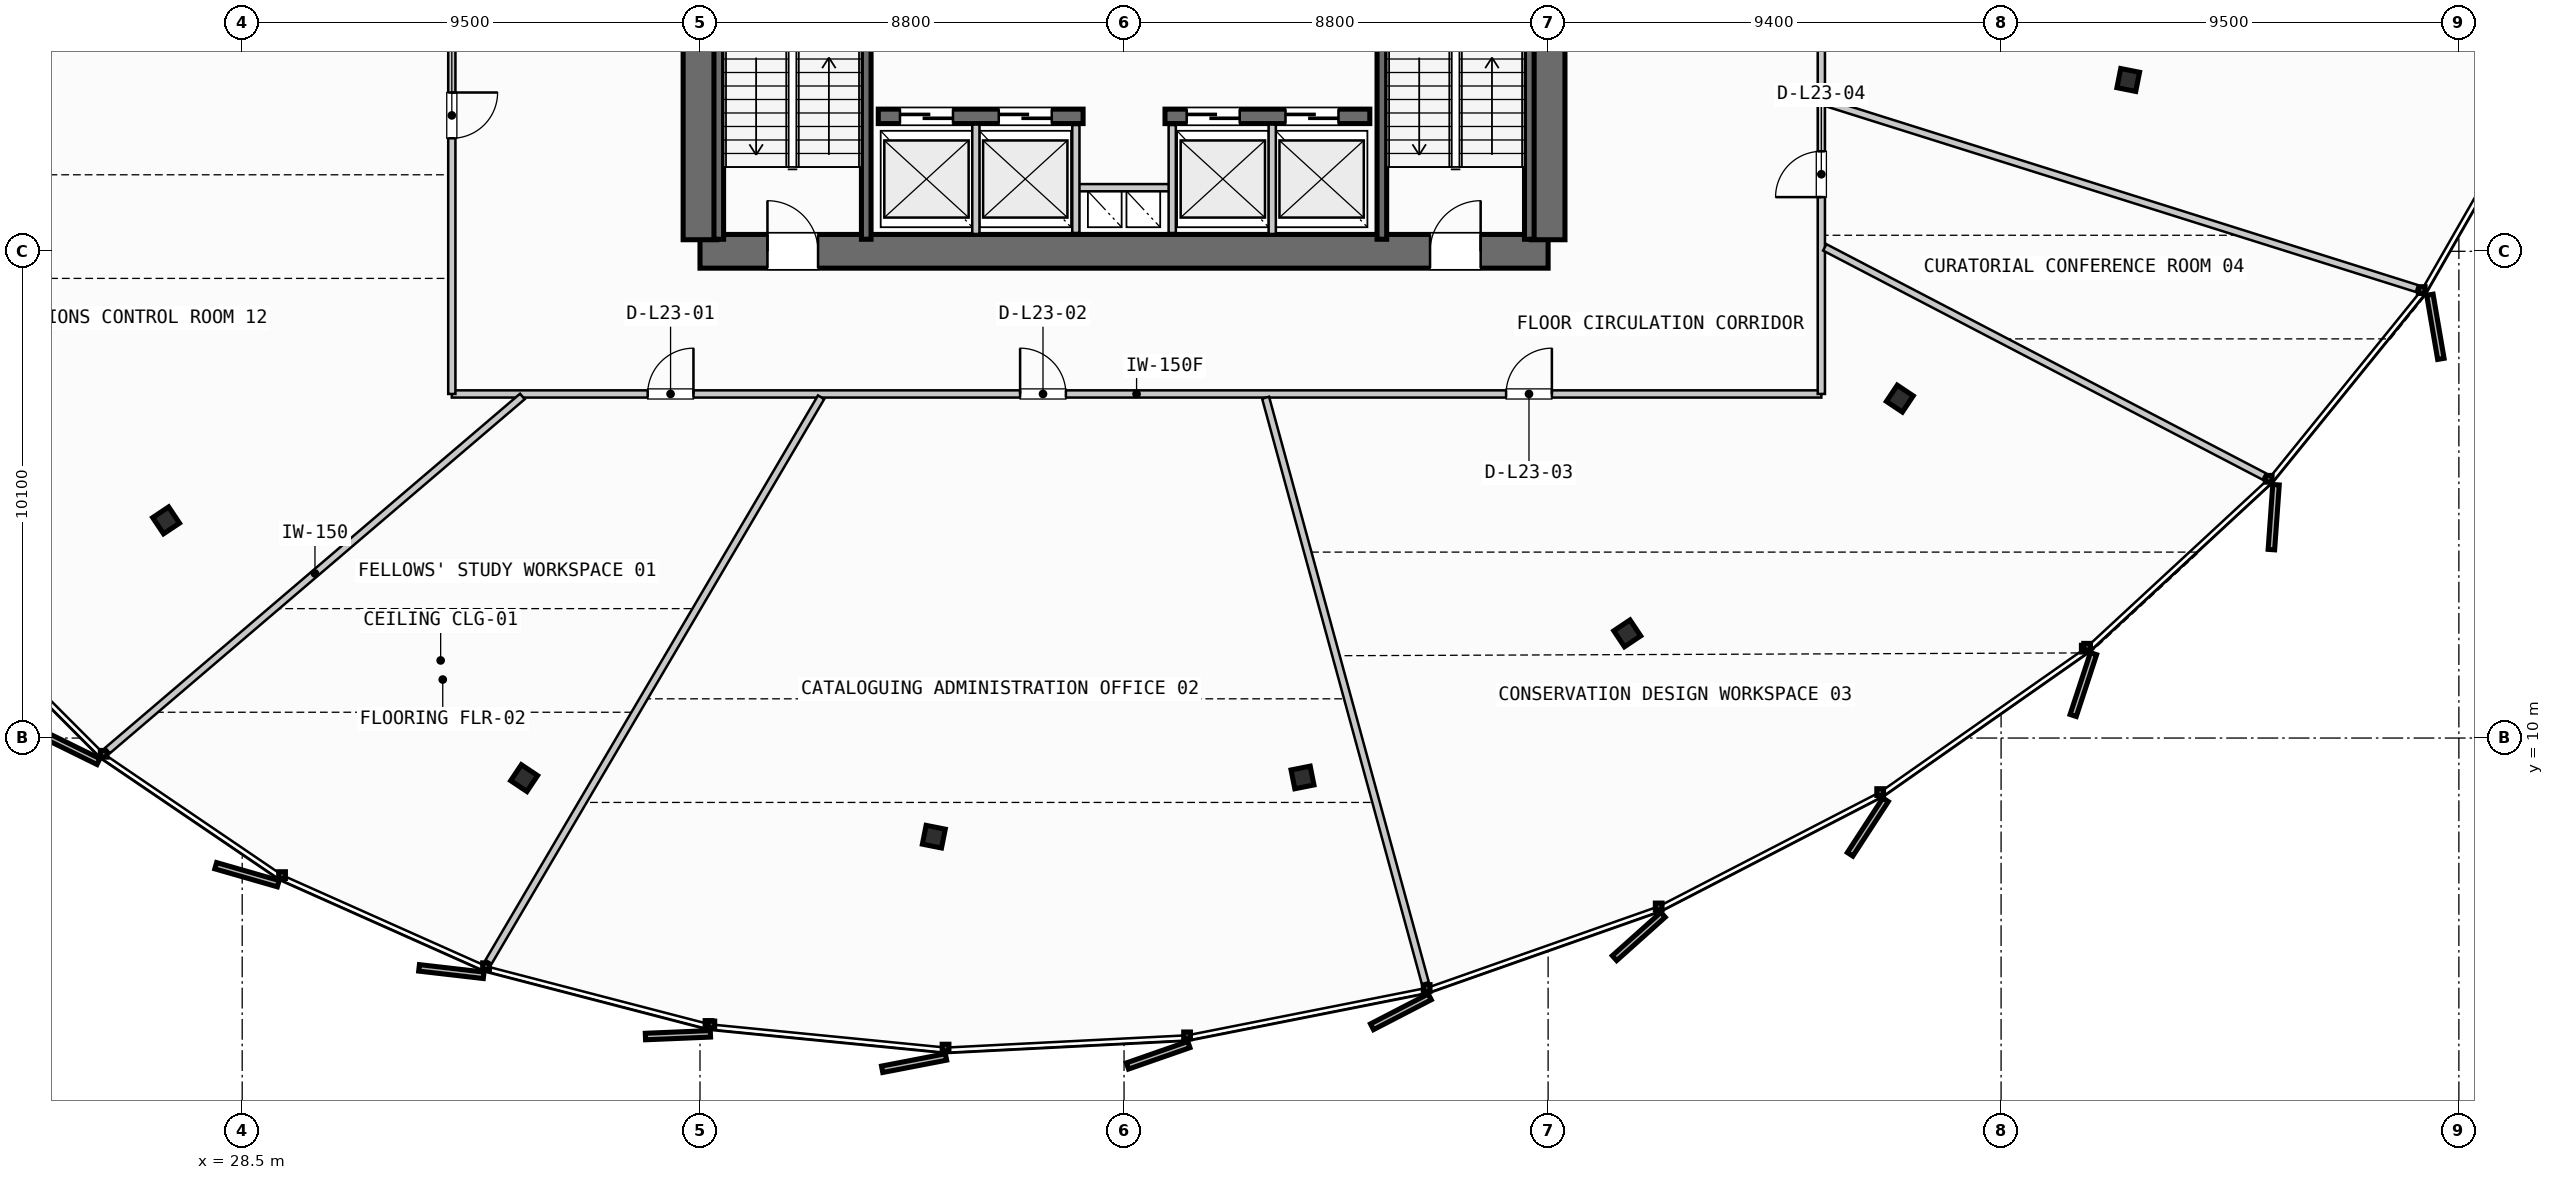
"""IFC4 building model, lengths in metres.
Left out: names, types, materials, properties, quantities, classifications, styles, units other than length and angle.
Written with IfcOpenShell. Run it as: python <this file> out.ifc"""

import sys

from ifc_helpers import new_model, si_unit, direction, frame, frame_2d, origin, origin_2d, place, context, subcontext, project, spatial, rectangle, i_section, extrude, source, transform, mapped, element, fill, save


model = new_model("IFC4")
c1 = context("Model", 3, precision=1e-05, world=origin(), true_north=direction((0.0, 1.0)))
c2 = subcontext(c1, "Body", "Model", "MODEL_VIEW")
j1 = project(units=[si_unit("LENGTHUNIT", "METRE"), si_unit("PLANEANGLEUNIT", "RADIAN")], contexts=[c1])
p1 = place(None, origin())
s1 = spatial("IfcSite", under=j1, at=p1, CompositionType="ELEMENT")
p2 = place(p1, origin())
s2 = spatial("IfcBuilding", under=s1, at=p2, CompositionType="ELEMENT")
p3 = place(p2, frame((0.0, 0.0, 96.4)))
s3 = spatial("IfcBuildingStorey", under=s2, at=p3, CompositionType="ELEMENT", Elevation=96.4)
p4 = place(p3, frame((38.0, 20.1, 0.0), z_axis=(0.0, 0.0, 1.0), x_axis=(1.0, 0.0, 0.0)))
e1 = element("IfcWall", 1, at=p4, inside=s3, PredefinedType="SHEAR", context=c2, shape_type="SweptSolid", body=[
    extrude(rectangle(XDim=17.6, YDim=0.7, at=frame_2d((8.8, 0.0))), origin(), (0.0, 0.0, 1.0), 3.35),
])
p5 = place(p4, frame((1.4, 0.0, 0.0)))
e2 = element("IfcOpeningElement", 2, at=p5, cuts=e1, PredefinedType="OPENING", context=c2, shape_type="SweptSolid", body=[
    extrude(rectangle(XDim=1.05, YDim=2.15, at=frame_2d((0.525, 1.075))), frame((0.0, 0.36, 0.0), z_axis=(0.0, -1.0, 0.0), x_axis=(1.0, 0.0, 0.0)), (0.0, 0.0, 1.0), 0.72),
])
p6 = place(p4, frame((15.15, 0.0, 0.0)))
e3 = element("IfcOpeningElement", 3, at=p6, cuts=e1, PredefinedType="OPENING", context=c2, shape_type="SweptSolid", body=[
    extrude(rectangle(XDim=1.05, YDim=2.15, at=frame_2d((0.525, 1.075))), frame((0.0, 0.36, 0.0), z_axis=(0.0, -1.0, 0.0), x_axis=(1.0, 0.0, 0.0)), (0.0, 0.0, 1.0), 0.72),
])
p7 = place(p3, frame((38.0, 35.26, 0.0), z_axis=(0.0, 0.0, 1.0), x_axis=(0.0, -1.0, 0.0)))
e4 = element("IfcWall", 4, at=p7, inside=s3, PredefinedType="SHEAR", context=c2, shape_type="SweptSolid", body=[
    extrude(rectangle(XDim=14.92, YDim=0.7, at=frame_2d((7.46, 0.0))), origin(), (0.0, 0.0, 1.0), 3.35),
])
p8 = place(p7, frame((5.21, 0.0, 0.0)))
e5 = element("IfcOpeningElement", 5, at=p8, cuts=e4, PredefinedType="OPENING", context=c2, shape_type="SweptSolid", body=[
    extrude(rectangle(XDim=1.1, YDim=2.2, at=frame_2d((0.55, 1.1))), frame((0.0, 0.36, 0.0), z_axis=(0.0, -1.0, 0.0), x_axis=(1.0, 0.0, 0.0)), (0.0, 0.0, 1.0), 0.72),
])
p9 = place(p3, frame((55.6, 20.34, 0.0), z_axis=(0.0, 0.0, 1.0), x_axis=(0.0, 1.0, 0.0)))
e6 = element("IfcWall", 6, at=p9, inside=s3, PredefinedType="SHEAR", context=c2, shape_type="SweptSolid", body=[
    extrude(rectangle(XDim=14.92, YDim=0.7, at=frame_2d((7.46, 0.0))), origin(), (0.0, 0.0, 1.0), 3.35),
])
p10 = place(p9, frame((12.71, 0.0, 0.0)))
e7 = element("IfcOpeningElement", 7, at=p10, cuts=e6, PredefinedType="OPENING", context=c2, shape_type="SweptSolid", body=[
    extrude(rectangle(XDim=1.05, YDim=2.15, at=frame_2d((0.525, 1.075))), frame((0.0, 0.36, 0.0), z_axis=(0.0, -1.0, 0.0), x_axis=(1.0, 0.0, 0.0)), (0.0, 0.0, 1.0), 0.72),
])
p11 = place(p9, frame((8.61, 0.0, 0.0)))
e8 = element("IfcOpeningElement", 8, at=p11, cuts=e6, PredefinedType="OPENING", context=c2, shape_type="SweptSolid", body=[
    extrude(rectangle(XDim=1.1, YDim=2.2, at=frame_2d((0.55, 1.1))), frame((0.0, 0.36, 0.0), z_axis=(0.0, -1.0, 0.0), x_axis=(1.0, 0.0, 0.0)), (0.0, 0.0, 1.0), 0.72),
])
p12 = place(p3, frame((41.7, 22.9, 0.0), z_axis=(0.0, 0.0, 1.0), x_axis=(1.0, 0.0, 0.0)))
e9 = element("IfcWall", 9, at=p12, inside=s3, PredefinedType="SHEAR", context=c2, shape_type="SweptSolid", body=[
    extrude(rectangle(XDim=4.25, YDim=0.3, at=frame_2d((2.125, 0.0))), origin(), (0.0, 0.0, 1.0), 3.35),
])
p13 = place(p12, frame((0.45, 0.0, 0.0)))
e10 = element("IfcOpeningElement", 10, at=p13, cuts=e9, PredefinedType="OPENING", context=c2, shape_type="SweptSolid", body=[
    extrude(rectangle(XDim=1.1, YDim=2.2, at=frame_2d((0.55, 1.1))), frame((0.0, 0.16, 0.0), z_axis=(0.0, -1.0, 0.0), x_axis=(1.0, 0.0, 0.0)), (0.0, 0.0, 1.0), 0.32),
])
p14 = place(p12, frame((2.5, 0.0, 0.0)))
e11 = element("IfcOpeningElement", 11, at=p14, cuts=e9, PredefinedType="OPENING", context=c2, shape_type="SweptSolid", body=[
    extrude(rectangle(XDim=1.1, YDim=2.2, at=frame_2d((0.55, 1.1))), frame((0.0, 0.16, 0.0), z_axis=(0.0, -1.0, 0.0), x_axis=(1.0, 0.0, 0.0)), (0.0, 0.0, 1.0), 0.32),
])
p15 = place(p3, frame((47.65, 22.9, 0.0), z_axis=(0.0, 0.0, 1.0), x_axis=(1.0, 0.0, 0.0)))
e12 = element("IfcWall", 12, at=p15, inside=s3, PredefinedType="SHEAR", context=c2, shape_type="SweptSolid", body=[
    extrude(rectangle(XDim=4.25, YDim=0.3, at=frame_2d((2.125, 0.0))), origin(), (0.0, 0.0, 1.0), 3.35),
])
p16 = place(p15, frame((0.45, 0.0, 0.0)))
e13 = element("IfcOpeningElement", 13, at=p16, cuts=e12, PredefinedType="OPENING", context=c2, shape_type="SweptSolid", body=[
    extrude(rectangle(XDim=1.1, YDim=2.2, at=frame_2d((0.55, 1.1))), frame((0.0, 0.16, 0.0), z_axis=(0.0, -1.0, 0.0), x_axis=(1.0, 0.0, 0.0)), (0.0, 0.0, 1.0), 0.32),
])
p17 = place(p15, frame((2.5, 0.0, 0.0)))
e14 = element("IfcOpeningElement", 14, at=p17, cuts=e12, PredefinedType="OPENING", context=c2, shape_type="SweptSolid", body=[
    extrude(rectangle(XDim=1.1, YDim=2.2, at=frame_2d((0.55, 1.1))), frame((0.0, 0.16, 0.0), z_axis=(0.0, -1.0, 0.0), x_axis=(1.0, 0.0, 0.0)), (0.0, 0.0, 1.0), 0.32),
])
m1 = source(origin(), c2, "Body", "SweptSolid", [
    extrude(i_section(OverallWidth=0.405, OverallDepth=0.398, WebThickness=0.035, FlangeThickness=0.056, FilletRadius=0.015, at=origin_2d()), origin(), (0.0, 0.0, 1.0), 3.35),
])
for number, where, z_axis, x_axis in (
    (15, (26.921, 14.517, 0.0), (0.0, 0.0, 1.0), (-0.831, -0.556, 0.0)),
    (16, (34.351, 9.168, 0.0), (0.0, 0.0, 1.0), (-0.556, -0.831, 0.0)),
    (17, (42.852, 7.954, 0.0), (0.0, 0.0, 1.0), (-0.195, -0.981, 0.0)),
    (18, (50.503, 9.182, 0.0), (0.0, 0.0, 1.0), (0.195, -0.981, 0.0)),
    (19, (57.242, 12.172, 0.0), (0.0, 0.0, 1.0), (0.556, -0.831, 0.0)),
    (20, (62.899, 17.043, 0.0), (0.0, 0.0, 1.0), (0.831, -0.556, 0.0)),
    (21, (67.639, 23.655, 0.0), (0.0, 0.0, 1.0), (0.981, -0.195, 0.0)),
):
    element("IfcColumn", number, at=place(p3, frame(where, z_axis=z_axis, x_axis=x_axis)), inside=s3, PredefinedType="COLUMN", context=c2, shape_type="MappedRepresentation", body=[
        mapped(m1, transform((0.0, 0.0, 0.0), scale=1.0)),
    ])
for number, where, z_axis, x_axis in (
    (22, (41.45, 27.7, 0.0), (0.0, 0.0, 1.0), (0.0, -1.0, 0.0)),
    (23, (38.39, 20.35, 0.0), (0.0, 0.0, 1.0), (0.0, 1.0, 0.0)),
    (24, (55.21, 27.7, 0.0), (0.0, 0.0, 1.0), (0.0, -1.0, 0.0)),
    (25, (52.15, 20.35, 0.0), (0.0, 0.0, 1.0), (0.0, 1.0, 0.0)),
):
    element("IfcWall", number, at=place(p3, frame(where, z_axis=z_axis, x_axis=x_axis)), inside=s3, PredefinedType="SHEAR", context=c2, shape_type="SweptSolid", body=[
        extrude(rectangle(XDim=7.35, YDim=0.2, at=frame_2d((3.675, 0.0))), origin(), (0.0, 0.0, 1.0), 3.35),
    ])
p18 = place(p3, frame((45.8, 21.42, 0.0), z_axis=(0.0, 0.0, 1.0), x_axis=(1.0, 0.0, 0.0)))
e26 = element("IfcWall", 26, at=p18, inside=s3, PredefinedType="PARTITIONING", context=c2, shape_type="SweptSolid", body=[
    extrude(rectangle(XDim=2.0, YDim=0.15, at=frame_2d((1.0, 0.0))), origin(), (0.0, 0.0, 1.0), 2.28),
])
for number, where, z_axis, x_axis in (
    (27, (45.8, 20.48, 0.0), (0.0, 0.0, 1.0), (0.0, 1.0, 0.0)),
    (28, (47.8, 20.48, 0.0), (0.0, 0.0, 1.0), (0.0, 1.0, 0.0)),
):
    element("IfcWall", number, at=place(p3, frame(where, z_axis=z_axis, x_axis=x_axis)), inside=s3, PredefinedType="PARTITIONING", context=c2, shape_type="SweptSolid", body=[
        extrude(rectangle(XDim=2.24, YDim=0.15, at=frame_2d((1.12, 0.0))), origin(), (0.0, 0.0, 1.0), 2.28),
    ])
for number, where, z_axis, x_axis in (
    (29, (43.725, 20.46, 0.0), (0.0, 0.0, 1.0), (0.0, 1.0, 0.0)),
    (30, (49.875, 20.46, 0.0), (0.0, 0.0, 1.0), (0.0, 1.0, 0.0)),
):
    element("IfcWall", number, at=place(p3, frame(where, z_axis=z_axis, x_axis=x_axis)), inside=s3, PredefinedType="PARTITIONING", context=c2, shape_type="SweptSolid", body=[
        extrude(rectangle(XDim=2.27, YDim=0.15, at=frame_2d((1.135, 0.0))), origin(), (0.0, 0.0, 1.0), 2.28),
    ])
p19 = place(p3, frame((32.85, 17.14, 0.0), z_axis=(0.0, 0.0, 1.0), x_axis=(1.0, 0.0, 0.0)))
e31 = element("IfcWall", 31, at=p19, inside=s3, PredefinedType="PARTITIONING", context=c2, shape_type="SweptSolid", body=[
    extrude(rectangle(XDim=28.42, YDim=0.15, at=frame_2d((14.21, 0.0))), origin(), (0.0, 0.0, 1.0), 2.28),
])
p20 = place(p19, frame((4.064, 0.0, 0.0)))
e32 = element("IfcOpeningElement", 32, at=p20, cuts=e31, PredefinedType="OPENING", context=c2, shape_type="SweptSolid", body=[
    extrude(rectangle(XDim=0.95, YDim=2.15, at=frame_2d((0.475, 1.075))), frame((0.0, 0.085, 0.0), z_axis=(0.0, -1.0, 0.0), x_axis=(1.0, 0.0, 0.0)), (0.0, 0.0, 1.0), 0.17),
])
p21 = place(p19, frame((11.793, 0.0, 0.0)))
e33 = element("IfcOpeningElement", 33, at=p21, cuts=e31, PredefinedType="OPENING", context=c2, shape_type="SweptSolid", body=[
    extrude(rectangle(XDim=0.95, YDim=2.15, at=frame_2d((0.475, 1.075))), frame((0.0, 0.085, 0.0), z_axis=(0.0, -1.0, 0.0), x_axis=(1.0, 0.0, 0.0)), (0.0, 0.0, 1.0), 0.17),
])
p22 = place(p19, frame((21.878, 0.0, 0.0)))
e34 = element("IfcOpeningElement", 34, at=p22, cuts=e31, PredefinedType="OPENING", context=c2, shape_type="SweptSolid", body=[
    extrude(rectangle(XDim=0.95, YDim=2.15, at=frame_2d((0.475, 1.075))), frame((0.0, 0.085, 0.0), z_axis=(0.0, -1.0, 0.0), x_axis=(1.0, 0.0, 0.0)), (0.0, 0.0, 1.0), 0.17),
])
p23 = place(p3, frame((61.27, 17.14, 0.0), z_axis=(0.0, 0.0, 1.0), x_axis=(0.0, 1.0, 0.0)))
e35 = element("IfcWall", 35, at=p23, inside=s3, PredefinedType="PARTITIONING", context=c2, shape_type="SweptSolid", body=[
    extrude(rectangle(XDim=20.48, YDim=0.15, at=frame_2d((10.24, 0.0))), origin(), (0.0, 0.0, 1.0), 2.28),
])
p24 = place(p23, frame((4.084, 0.0, 0.0)))
e36 = element("IfcOpeningElement", 36, at=p24, cuts=e35, PredefinedType="OPENING", context=c2, shape_type="SweptSolid", body=[
    extrude(rectangle(XDim=0.95, YDim=2.15, at=frame_2d((0.475, 1.075))), frame((0.0, 0.085, 0.0), z_axis=(0.0, -1.0, 0.0), x_axis=(1.0, 0.0, 0.0)), (0.0, 0.0, 1.0), 0.17),
])
p25 = place(p23, frame((8.875, 0.0, 0.0)))
e37 = element("IfcOpeningElement", 37, at=p25, cuts=e35, PredefinedType="OPENING", context=c2, shape_type="SweptSolid", body=[
    extrude(rectangle(XDim=0.95, YDim=2.15, at=frame_2d((0.475, 1.075))), frame((0.0, 0.085, 0.0), z_axis=(0.0, -1.0, 0.0), x_axis=(1.0, 0.0, 0.0)), (0.0, 0.0, 1.0), 0.17),
])
p26 = place(p23, frame((15.482, 0.0, 0.0)))
e38 = element("IfcOpeningElement", 38, at=p26, cuts=e35, PredefinedType="OPENING", context=c2, shape_type="SweptSolid", body=[
    extrude(rectangle(XDim=0.95, YDim=2.15, at=frame_2d((0.475, 1.075))), frame((0.0, 0.085, 0.0), z_axis=(0.0, -1.0, 0.0), x_axis=(1.0, 0.0, 0.0)), (0.0, 0.0, 1.0), 0.17),
])
p27 = place(p3, frame((32.85, 37.62, 0.0), z_axis=(0.0, 0.0, 1.0), x_axis=(0.0, -1.0, 0.0)))
e39 = element("IfcWall", 39, at=p27, inside=s3, PredefinedType="PARTITIONING", context=c2, shape_type="SweptSolid", body=[
    extrude(rectangle(XDim=20.48, YDim=0.15, at=frame_2d((10.24, 0.0))), origin(), (0.0, 0.0, 1.0), 2.28),
])
p28 = place(p27, frame((5.293, 0.0, 0.0)))
e40 = element("IfcOpeningElement", 40, at=p28, cuts=e39, PredefinedType="OPENING", context=c2, shape_type="SweptSolid", body=[
    extrude(rectangle(XDim=0.95, YDim=2.15, at=frame_2d((0.475, 1.075))), frame((0.0, 0.085, 0.0), z_axis=(0.0, -1.0, 0.0), x_axis=(1.0, 0.0, 0.0)), (0.0, 0.0, 1.0), 0.17),
])
p29 = place(p27, frame((14.225, 0.0, 0.0)))
e41 = element("IfcOpeningElement", 41, at=p29, cuts=e39, PredefinedType="OPENING", context=c2, shape_type="SweptSolid", body=[
    extrude(rectangle(XDim=0.95, YDim=2.15, at=frame_2d((0.475, 1.075))), frame((0.0, 0.085, 0.0), z_axis=(0.0, -1.0, 0.0), x_axis=(1.0, 0.0, 0.0)), (0.0, 0.0, 1.0), 0.17),
])
p30 = place(p3, frame((34.314, 17.088, 0.0), z_axis=(0.0, 0.0, 1.0), x_axis=(-0.760649717053, -0.649162543549, 0.0)))
e42 = element("IfcWall", 42, at=p30, inside=s3, PredefinedType="PARTITIONING", context=c2, shape_type="SweptSolid", body=[
    extrude(rectangle(XDim=11.317, YDim=0.15, at=frame_2d((5.659, 0.0))), origin(), (0.0, 0.0, 1.0), 2.28),
])
p31 = place(p3, frame((40.513, 17.071, 0.0), z_axis=(0.0, 0.0, 1.0), x_axis=(-0.507501886908, -0.861650645439, 0.0)))
e43 = element("IfcWall", 43, at=p31, inside=s3, PredefinedType="PARTITIONING", context=c2, shape_type="SweptSolid", body=[
    extrude(rectangle(XDim=13.596, YDim=0.15, at=frame_2d((6.798, 0.0))), origin(), (0.0, 0.0, 1.0), 2.28),
])
p32 = place(p3, frame((49.737, 17.063, 0.0), z_axis=(0.0, 0.0, 1.0), x_axis=(0.263260133771, -0.964724884082, 0.0)))
e44 = element("IfcWall", 44, at=p32, inside=s3, PredefinedType="PARTITIONING", context=c2, shape_type="SweptSolid", body=[
    extrude(rectangle(XDim=12.592, YDim=0.15, at=frame_2d((6.296, 0.0))), origin(), (0.0, 0.0, 1.0), 2.28),
])
p33 = place(p3, frame((61.341, 20.181, 0.0), z_axis=(0.0, 0.0, 1.0), x_axis=(0.886775248426, -0.462200885741, 0.0)))
e45 = element("IfcWall", 45, at=p33, inside=s3, PredefinedType="PARTITIONING", context=c2, shape_type="SweptSolid", body=[
    extrude(rectangle(XDim=10.284, YDim=0.15, at=frame_2d((5.142, 0.0))), origin(), (0.0, 0.0, 1.0), 2.28),
])
p34 = place(p3, frame((61.346, 23.193, 0.0), z_axis=(0.0, 0.0, 1.0), x_axis=(0.953881626894, -0.300183013965, 0.0)))
e46 = element("IfcWall", 46, at=p34, inside=s3, PredefinedType="PARTITIONING", context=c2, shape_type="SweptSolid", body=[
    extrude(rectangle(XDim=12.877, YDim=0.15, at=frame_2d((6.438, 0.0))), origin(), (0.0, 0.0, 1.0), 2.28),
])
m2 = source(origin(), c2, "Body", "SweptSolid", [
    extrude(rectangle(XDim=1.05, YDim=2.15, at=frame_2d((0.525, 1.075))), frame((0.0, 0.025, 0.0), z_axis=(0.0, -1.0, 0.0), x_axis=(1.0, 0.0, 0.0)), (0.0, 0.0, 1.0), 0.05),
])
p35 = place(p5, origin())
e47 = element("IfcDoor", 47, at=p35, inside=s3, OperationType="SINGLE_SWING_LEFT", PredefinedType="DOOR", context=c2, shape_type="MappedRepresentation", body=[
    mapped(m2, transform((0.0, 0.0, 0.0), scale=1.0)),
])
fill(e2, e47)
p36 = place(p6, origin())
e48 = element("IfcDoor", 48, at=p36, inside=s3, OperationType="SINGLE_SWING_RIGHT", PredefinedType="DOOR", context=c2, shape_type="MappedRepresentation", body=[
    mapped(m2, transform((0.0, 0.0, 0.0), scale=1.0)),
])
fill(e3, e48)
m3 = source(origin(), c2, "Body", "SweptSolid", [
    extrude(rectangle(XDim=1.1, YDim=2.2, at=frame_2d((0.55, 1.1))), frame((0.0, 0.025, 0.0), z_axis=(0.0, -1.0, 0.0), x_axis=(1.0, 0.0, 0.0)), (0.0, 0.0, 1.0), 0.05),
])
p37 = place(p13, origin())
e49 = element("IfcDoor", 49, at=p37, inside=s3, OperationType="SLIDING_TO_LEFT", PredefinedType="DOOR", context=c2, shape_type="MappedRepresentation", body=[
    mapped(m3, transform((0.0, 0.0, 0.0), scale=1.0)),
])
fill(e10, e49)
p38 = place(p14, origin())
e50 = element("IfcDoor", 50, at=p38, inside=s3, OperationType="SLIDING_TO_LEFT", PredefinedType="DOOR", context=c2, shape_type="MappedRepresentation", body=[
    mapped(m3, transform((0.0, 0.0, 0.0), scale=1.0)),
])
fill(e11, e50)
p39 = place(p16, origin())
e51 = element("IfcDoor", 51, at=p39, inside=s3, OperationType="SLIDING_TO_LEFT", PredefinedType="DOOR", context=c2, shape_type="MappedRepresentation", body=[
    mapped(m3, transform((0.0, 0.0, 0.0), scale=1.0)),
])
fill(e13, e51)
p40 = place(p17, origin())
e52 = element("IfcDoor", 52, at=p40, inside=s3, OperationType="SLIDING_TO_LEFT", PredefinedType="DOOR", context=c2, shape_type="MappedRepresentation", body=[
    mapped(m3, transform((0.0, 0.0, 0.0), scale=1.0)),
])
fill(e14, e52)
m4 = source(origin(), c2, "Body", "SweptSolid", [
    extrude(rectangle(XDim=0.95, YDim=2.15, at=frame_2d((0.475, 1.075))), frame((0.0, 0.025, 0.0), z_axis=(0.0, -1.0, 0.0), x_axis=(1.0, 0.0, 0.0)), (0.0, 0.0, 1.0), 0.05),
])
p41 = place(p20, origin())
e53 = element("IfcDoor", 53, at=p41, inside=s3, OperationType="SINGLE_SWING_RIGHT", PredefinedType="DOOR", context=c2, shape_type="MappedRepresentation", body=[
    mapped(m4, transform((0.0, 0.0, 0.0), scale=1.0)),
])
fill(e32, e53)
p42 = place(p21, origin())
e54 = element("IfcDoor", 54, at=p42, inside=s3, OperationType="SINGLE_SWING_LEFT", PredefinedType="DOOR", context=c2, shape_type="MappedRepresentation", body=[
    mapped(m4, transform((0.0, 0.0, 0.0), scale=1.0)),
])
fill(e33, e54)
p43 = place(p22, origin())
e55 = element("IfcDoor", 55, at=p43, inside=s3, OperationType="SINGLE_SWING_RIGHT", PredefinedType="DOOR", context=c2, shape_type="MappedRepresentation", body=[
    mapped(m4, transform((0.0, 0.0, 0.0), scale=1.0)),
])
fill(e34, e55)
p44 = place(p24, origin())
e56 = element("IfcDoor", 56, at=p44, inside=s3, OperationType="SINGLE_SWING_LEFT", PredefinedType="DOOR", context=c2, shape_type="MappedRepresentation", body=[
    mapped(m4, transform((0.0, 0.0, 0.0), scale=1.0)),
])
fill(e36, e56)
p45 = place(p29, origin())
e57 = element("IfcDoor", 57, at=p45, inside=s3, OperationType="SINGLE_SWING_LEFT", PredefinedType="DOOR", context=c2, shape_type="MappedRepresentation", body=[
    mapped(m4, transform((0.0, 0.0, 0.0), scale=1.0)),
])
fill(e41, e57)
save(model, sys.argv[1])
